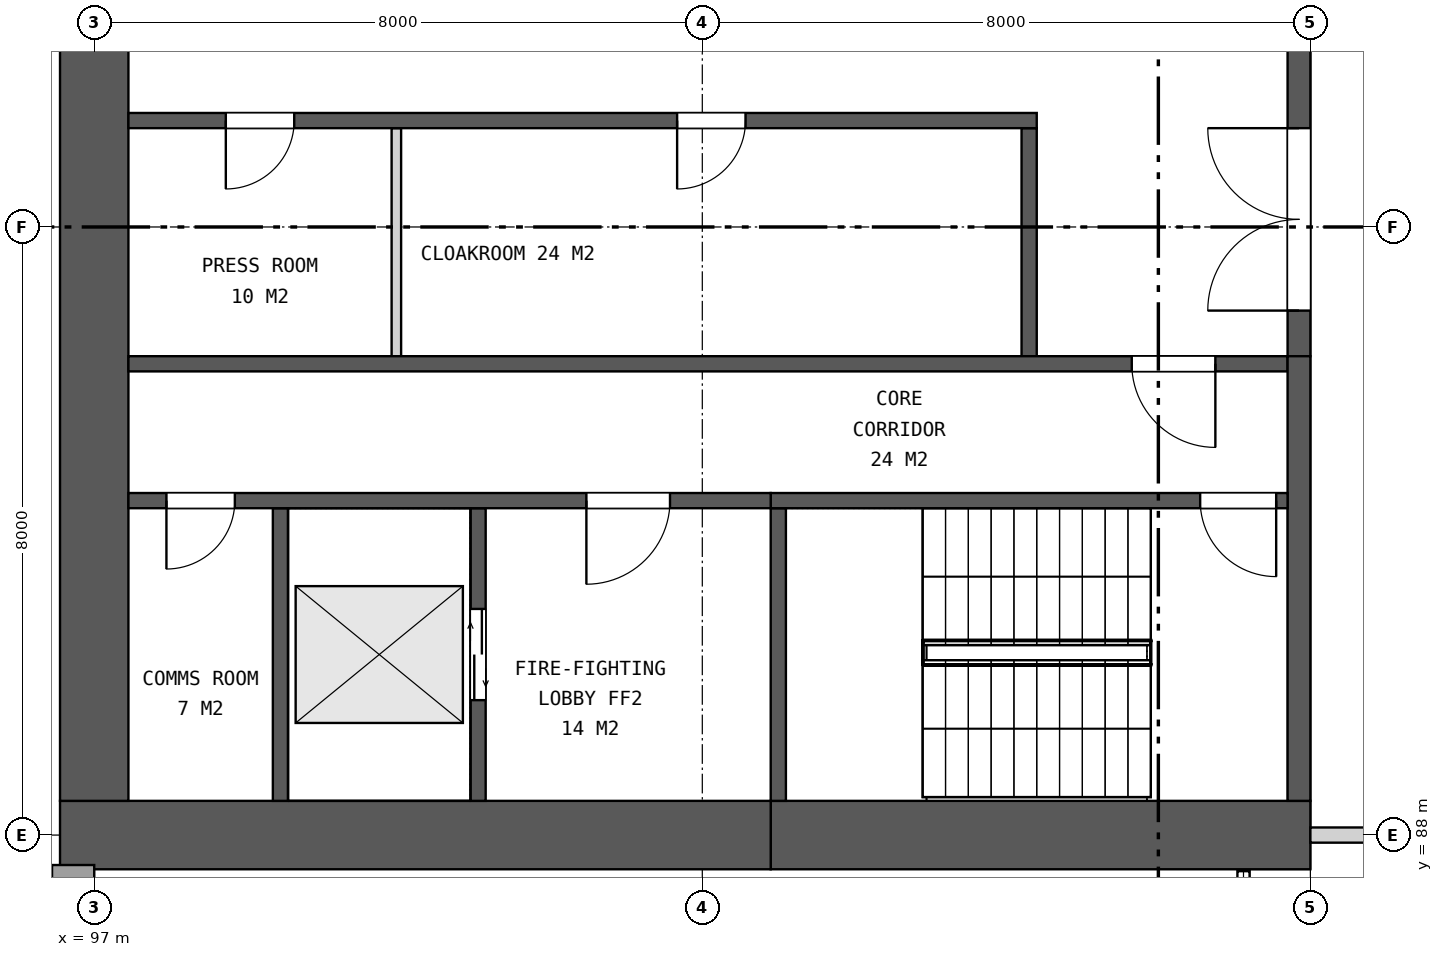
"""IFC4 building model, lengths in metres.
Left out: names, types, materials, properties, quantities, classifications, styles, units other than length and angle.
Written with IfcOpenShell. Run it as: python <this file> out.ifc"""

import sys

from ifc_helpers import new_model, si_unit, direction, frame, frame_2d, origin, place, context, subcontext, project, spatial, rectangle, extrude, element, fill, save


model = new_model("IFC4")
c1 = context("Model", 3, precision=1e-05, world=origin(), true_north=direction((0.0, 1.0)))
c2 = subcontext(c1, "Body", "Model", "MODEL_VIEW")
j1 = project(units=[si_unit("LENGTHUNIT", "METRE"), si_unit("PLANEANGLEUNIT", "RADIAN")], contexts=[c1])
p1 = place(None, origin())
s1 = spatial("IfcSite", under=j1, at=p1, CompositionType="ELEMENT")
p2 = place(p1, origin())
s2 = spatial("IfcBuilding", under=s1, at=p2, CompositionType="ELEMENT")
p3 = place(p2, frame((0.0, 0.0, 10.0)))
s3 = spatial("IfcBuildingStorey", under=s2, at=p3, CompositionType="ELEMENT", Elevation=10.0)
p4 = place(p3, frame((113.0, 88.0, 0.0), z_axis=(0.0, 0.0, 1.0), x_axis=(-1.0, 0.0, 0.0)))
e1 = element("IfcWall", 1, at=p4, inside=s3, PredefinedType="SHEAR", context=c2, shape_type="SweptSolid", body=[
    extrude(rectangle(XDim=7.1, YDim=0.9, at=frame_2d((3.55, 0.0))), origin(), (0.0, 0.0, 1.0), 7.5),
])
p5 = place(p3, frame((105.9, 88.0, 0.0), z_axis=(0.0, 0.0, 1.0), x_axis=(-1.0, 0.0, 0.0)))
e2 = element("IfcWall", 2, at=p5, inside=s3, PredefinedType="SHEAR", context=c2, shape_type="SweptSolid", body=[
    extrude(rectangle(XDim=9.35, YDim=0.9, at=frame_2d((4.675, 0.0))), origin(), (0.0, 0.0, 1.0), 7.5),
])
p6 = place(p3, frame((97.0, 111.55, 0.0), z_axis=(0.0, 0.0, 1.0), x_axis=(0.0, -1.0, 0.0)))
e3 = element("IfcWall", 3, at=p6, inside=s3, PredefinedType="SHEAR", context=c2, shape_type="SweptSolid", body=[
    extrude(rectangle(XDim=23.1, YDim=0.9, at=frame_2d((11.55, 0.0))), origin(), (0.0, 0.0, 1.0), 7.5),
])
p7 = place(p6, frame((10.35, 0.0, 0.0)))
e4 = element("IfcOpeningElement", 4, at=p7, cuts=e3, PredefinedType="OPENING", context=c2, shape_type="SweptSolid", body=[
    extrude(rectangle(XDim=2.4, YDim=2.4, at=frame_2d((1.2, 1.2))), frame((0.0, 0.46, 0.0), z_axis=(0.0, -1.0, 0.0), x_axis=(1.0, 0.0, 0.0)), (0.0, 0.0, 1.0), 0.92),
])
p8 = place(p3, frame((112.85, 105.7, 0.0), z_axis=(0.0, 0.0, 1.0), x_axis=(0.0, -1.0, 0.0)))
e5 = element("IfcWall", 5, at=p8, inside=s3, PredefinedType="SHEAR", context=c2, shape_type="SweptSolid", body=[
    extrude(rectangle(XDim=11.4, YDim=0.3, at=frame_2d((5.7, 0.0))), origin(), (0.0, 0.0, 1.0), 7.5),
])
p9 = place(p8, frame((0.6, 0.0, 0.0)))
e6 = element("IfcOpeningElement", 6, at=p9, cuts=e5, PredefinedType="OPENING", context=c2, shape_type="SweptSolid", body=[
    extrude(rectangle(XDim=2.4, YDim=2.4, at=frame_2d((1.2, 1.2))), frame((0.0, 0.16, 0.0), z_axis=(0.0, -1.0, 0.0), x_axis=(1.0, 0.0, 0.0)), (0.0, 0.0, 1.0), 0.32),
])
p10 = place(p8, frame((4.5, 0.0, 0.0)))
e7 = element("IfcOpeningElement", 7, at=p10, cuts=e5, PredefinedType="OPENING", context=c2, shape_type="SweptSolid", body=[
    extrude(rectangle(XDim=2.4, YDim=2.4, at=frame_2d((1.2, 1.2))), frame((0.0, 0.16, 0.0), z_axis=(0.0, -1.0, 0.0), x_axis=(1.0, 0.0, 0.0)), (0.0, 0.0, 1.0), 0.32),
])
p11 = place(p8, frame((8.4, 0.0, 0.0)))
e8 = element("IfcOpeningElement", 8, at=p11, cuts=e5, PredefinedType="OPENING", context=c2, shape_type="SweptSolid", body=[
    extrude(rectangle(XDim=2.4, YDim=2.4, at=frame_2d((1.2, 1.2))), frame((0.0, 0.16, 0.0), z_axis=(0.0, -1.0, 0.0), x_axis=(1.0, 0.0, 0.0)), (0.0, 0.0, 1.0), 0.32),
])
p12 = place(p3, frame((109.3, 97.3, 0.0), z_axis=(0.0, 0.0, 1.0), x_axis=(0.0, -1.0, 0.0)))
e9 = element("IfcWall", 9, at=p12, inside=s3, PredefinedType="SHEAR", context=c2, shape_type="SweptSolid", body=[
    extrude(rectangle(XDim=3.0, YDim=0.2, at=frame_2d((1.5, 0.0))), origin(), (0.0, 0.0, 1.0), 7.5),
])
p13 = place(p3, frame((100.975, 97.3, 0.0), z_axis=(0.0, 0.0, 1.0), x_axis=(0.0, -1.0, 0.0)))
e10 = element("IfcWall", 10, at=p13, inside=s3, PredefinedType="PARTITIONING", context=c2, shape_type="SweptSolid", body=[
    extrude(rectangle(XDim=3.0, YDim=0.125, at=frame_2d((1.5, 0.0))), origin(), (0.0, 0.0, 1.0), 7.5),
])
p14 = place(p3, frame((109.4, 97.4, 0.0), z_axis=(0.0, 0.0, 1.0), x_axis=(-1.0, 0.0, 0.0)))
e11 = element("IfcWall", 11, at=p14, inside=s3, PredefinedType="SHEAR", context=c2, shape_type="SweptSolid", body=[
    extrude(rectangle(XDim=11.95, YDim=0.2, at=frame_2d((5.975, 0.0))), origin(), (0.0, 0.0, 1.0), 7.5),
])
p15 = place(p14, frame((3.831, 0.0, 0.0)))
e12 = element("IfcOpeningElement", 12, at=p15, cuts=e11, PredefinedType="OPENING", context=c2, shape_type="SweptSolid", body=[
    extrude(rectangle(XDim=0.9, YDim=2.1, at=frame_2d((0.45, 1.05))), frame((0.0, 0.11, 0.0), z_axis=(0.0, -1.0, 0.0), x_axis=(1.0, 0.0, 0.0)), (0.0, 0.0, 1.0), 0.22),
])
p16 = place(p14, frame((9.769, 0.0, 0.0)))
e13 = element("IfcOpeningElement", 13, at=p16, cuts=e11, PredefinedType="OPENING", context=c2, shape_type="SweptSolid", body=[
    extrude(rectangle(XDim=0.9, YDim=2.1, at=frame_2d((0.45, 1.05))), frame((0.0, 0.11, 0.0), z_axis=(0.0, -1.0, 0.0), x_axis=(1.0, 0.0, 0.0)), (0.0, 0.0, 1.0), 0.22),
])
p17 = place(p3, frame((112.7, 94.2, 0.0), z_axis=(0.0, 0.0, 1.0), x_axis=(-1.0, 0.0, 0.0)))
e14 = element("IfcWall", 14, at=p17, inside=s3, PredefinedType="SHEAR", context=c2, shape_type="SweptSolid", body=[
    extrude(rectangle(XDim=15.25, YDim=0.2, at=frame_2d((7.625, 0.0))), origin(), (0.0, 0.0, 1.0), 7.5),
])
p18 = place(p17, frame((0.95, 0.0, 0.0)))
e15 = element("IfcOpeningElement", 15, at=p18, cuts=e14, PredefinedType="OPENING", context=c2, shape_type="SweptSolid", body=[
    extrude(rectangle(XDim=1.1, YDim=2.1, at=frame_2d((0.55, 1.05))), frame((0.0, 0.11, 0.0), z_axis=(0.0, -1.0, 0.0), x_axis=(1.0, 0.0, 0.0)), (0.0, 0.0, 1.0), 0.22),
])
p19 = place(p3, frame((112.85, 94.3, 0.0), z_axis=(0.0, 0.0, 1.0), x_axis=(0.0, -1.0, 0.0)))
e16 = element("IfcWall", 16, at=p19, inside=s3, PredefinedType="SHEAR", context=c2, shape_type="SweptSolid", body=[
    extrude(rectangle(XDim=5.85, YDim=0.3, at=frame_2d((2.925, 0.0))), origin(), (0.0, 0.0, 1.0), 7.5),
])
p20 = place(p3, frame((106.0, 92.3, 0.0), z_axis=(0.0, 0.0, 1.0), x_axis=(0.0, -1.0, 0.0)))
e17 = element("IfcWall", 17, at=p20, inside=s3, PredefinedType="SHEAR", context=c2, shape_type="SweptSolid", body=[
    extrude(rectangle(XDim=3.85, YDim=0.2, at=frame_2d((1.925, 0.0))), origin(), (0.0, 0.0, 1.0), 7.5),
])
p21 = place(p3, frame((102.05, 92.3, 0.0), z_axis=(0.0, 0.0, 1.0), x_axis=(0.0, -1.0, 0.0)))
e18 = element("IfcWall", 18, at=p21, inside=s3, PredefinedType="SHEAR", context=c2, shape_type="SweptSolid", body=[
    extrude(rectangle(XDim=3.85, YDim=0.2, at=frame_2d((1.925, 0.0))), origin(), (0.0, 0.0, 1.0), 7.5),
])
p22 = place(p21, frame((1.325, 0.0, 0.0)))
e19 = element("IfcOpeningElement", 19, at=p22, cuts=e18, PredefinedType="OPENING", context=c2, shape_type="SweptSolid", body=[
    extrude(rectangle(XDim=1.2, YDim=2.1, at=frame_2d((0.6, 1.05))), frame((0.0, 0.11, 0.0), z_axis=(0.0, -1.0, 0.0), x_axis=(1.0, 0.0, 0.0)), (0.0, 0.0, 1.0), 0.22),
])
p23 = place(p3, frame((99.45, 92.3, 0.0), z_axis=(0.0, 0.0, 1.0), x_axis=(0.0, -1.0, 0.0)))
e20 = element("IfcWall", 20, at=p23, inside=s3, PredefinedType="SHEAR", context=c2, shape_type="SweptSolid", body=[
    extrude(rectangle(XDim=3.85, YDim=0.2, at=frame_2d((1.925, 0.0))), origin(), (0.0, 0.0, 1.0), 7.5),
])
p24 = place(p3, frame((112.7, 92.4, 0.0), z_axis=(0.0, 0.0, 1.0), x_axis=(-1.0, 0.0, 0.0)))
e21 = element("IfcWall", 21, at=p24, inside=s3, PredefinedType="SHEAR", context=c2, shape_type="SweptSolid", body=[
    extrude(rectangle(XDim=6.8, YDim=0.2, at=frame_2d((3.4, 0.0))), origin(), (0.0, 0.0, 1.0), 7.5),
])
p25 = place(p24, frame((0.15, 0.0, 0.0)))
e22 = element("IfcOpeningElement", 22, at=p25, cuts=e21, PredefinedType="OPENING", context=c2, shape_type="SweptSolid", body=[
    extrude(rectangle(XDim=1.0, YDim=2.1, at=frame_2d((0.5, 1.05))), frame((0.0, 0.11, 0.0), z_axis=(0.0, -1.0, 0.0), x_axis=(1.0, 0.0, 0.0)), (0.0, 0.0, 1.0), 0.22),
])
p26 = place(p3, frame((105.9, 92.4, 0.0), z_axis=(0.0, 0.0, 1.0), x_axis=(-1.0, 0.0, 0.0)))
e23 = element("IfcWall", 23, at=p26, inside=s3, PredefinedType="SHEAR", context=c2, shape_type="SweptSolid", body=[
    extrude(rectangle(XDim=8.45, YDim=0.2, at=frame_2d((4.225, 0.0))), origin(), (0.0, 0.0, 1.0), 7.5),
])
p27 = place(p26, frame((1.325, 0.0, 0.0)))
e24 = element("IfcOpeningElement", 24, at=p27, cuts=e23, PredefinedType="OPENING", context=c2, shape_type="SweptSolid", body=[
    extrude(rectangle(XDim=1.1, YDim=2.1, at=frame_2d((0.55, 1.05))), frame((0.0, 0.11, 0.0), z_axis=(0.0, -1.0, 0.0), x_axis=(1.0, 0.0, 0.0)), (0.0, 0.0, 1.0), 0.22),
])
p28 = place(p26, frame((7.05, 0.0, 0.0)))
e25 = element("IfcOpeningElement", 25, at=p28, cuts=e23, PredefinedType="OPENING", context=c2, shape_type="SweptSolid", body=[
    extrude(rectangle(XDim=0.9, YDim=2.1, at=frame_2d((0.45, 1.05))), frame((0.0, 0.11, 0.0), z_axis=(0.0, -1.0, 0.0), x_axis=(1.0, 0.0, 0.0)), (0.0, 0.0, 1.0), 0.22),
])
p29 = place(p3, frame((96.445, 87.403, 0.0), z_axis=(0.0, 0.0, 1.0), x_axis=(1.0, 0.0, 0.0)))
e26 = element("IfcWall", 26, at=p29, inside=s3, PredefinedType="SOLIDWALL", context=c2, shape_type="SweptSolid", body=[
    extrude(rectangle(XDim=0.555, YDim=0.406, at=frame_2d((0.277, 0.0))), origin(), (0.0, 0.0, 1.0), 7.1),
])
p30 = place(p3, frame((113.0, 88.0, 0.0), z_axis=(0.0, 0.0, 1.0), x_axis=(1.0, 0.0, 0.0)))
e27 = element("IfcWall", 27, at=p30, inside=s3, PredefinedType="PARTITIONING", context=c2, shape_type="SweptSolid", body=[
    extrude(rectangle(XDim=7.4, YDim=0.2, at=frame_2d((3.7, 0.0))), origin(), (0.0, 0.0, 1.0), 6.551),
])
p31 = place(p30, frame((2.8, 0.0, 0.0)))
e28 = element("IfcOpeningElement", 28, at=p31, cuts=e27, PredefinedType="OPENING", context=c2, shape_type="SweptSolid", body=[
    extrude(rectangle(XDim=2.4, YDim=2.4, at=frame_2d((1.2, 1.2))), frame((0.0, 0.11, 0.0), z_axis=(0.0, -1.0, 0.0), x_axis=(1.0, 0.0, 0.0)), (0.0, 0.0, 1.0), 0.22),
])
p32 = place(p11, frame((2.4, 0.0, 0.0), z_axis=(0.0, 0.0, 1.0), x_axis=(-1.0, 0.0, 0.0)))
e29 = element("IfcDoor", 29, at=p32, inside=s3, OperationType="DOUBLE_DOOR_SINGLE_SWING", PredefinedType="DOOR", context=c2, shape_type="SweptSolid", body=[
    extrude(rectangle(XDim=2.4, YDim=2.4, at=frame_2d((1.2, 1.2))), frame((0.0, 0.025, 0.0), z_axis=(0.0, -1.0, 0.0), x_axis=(1.0, 0.0, 0.0)), (0.0, 0.0, 1.0), 0.05),
])
fill(e8, e29)
p33 = place(p15, origin())
e30 = element("IfcDoor", 30, at=p33, inside=s3, OperationType="SINGLE_SWING_RIGHT", PredefinedType="DOOR", context=c2, shape_type="SweptSolid", body=[
    extrude(rectangle(XDim=0.9, YDim=2.1, at=frame_2d((0.45, 1.05))), frame((0.0, 0.025, 0.0), z_axis=(0.0, -1.0, 0.0), x_axis=(1.0, 0.0, 0.0)), (0.0, 0.0, 1.0), 0.05),
])
fill(e12, e30)
p34 = place(p16, origin())
e31 = element("IfcDoor", 31, at=p34, inside=s3, OperationType="SINGLE_SWING_RIGHT", PredefinedType="DOOR", context=c2, shape_type="SweptSolid", body=[
    extrude(rectangle(XDim=0.9, YDim=2.1, at=frame_2d((0.45, 1.05))), frame((0.0, 0.025, 0.0), z_axis=(0.0, -1.0, 0.0), x_axis=(1.0, 0.0, 0.0)), (0.0, 0.0, 1.0), 0.05),
])
fill(e13, e31)
p35 = place(p18, origin())
e32 = element("IfcDoor", 32, at=p35, inside=s3, OperationType="SINGLE_SWING_LEFT", PredefinedType="DOOR", context=c2, shape_type="SweptSolid", body=[
    extrude(rectangle(XDim=1.1, YDim=2.1, at=frame_2d((0.55, 1.05))), frame((0.0, 0.025, 0.0), z_axis=(0.0, -1.0, 0.0), x_axis=(1.0, 0.0, 0.0)), (0.0, 0.0, 1.0), 0.05),
])
fill(e15, e32)
p36 = place(p22, origin())
e33 = element("IfcDoor", 33, at=p36, inside=s3, OperationType="DOUBLE_DOOR_SLIDING", PredefinedType="DOOR", context=c2, shape_type="SweptSolid", body=[
    extrude(rectangle(XDim=1.2, YDim=2.1, at=frame_2d((0.6, 1.05))), frame((0.0, 0.025, 0.0), z_axis=(0.0, -1.0, 0.0), x_axis=(1.0, 0.0, 0.0)), (0.0, 0.0, 1.0), 0.05),
])
fill(e19, e33)
p37 = place(p25, origin())
e34 = element("IfcDoor", 34, at=p37, inside=s3, OperationType="SINGLE_SWING_LEFT", PredefinedType="DOOR", context=c2, shape_type="SweptSolid", body=[
    extrude(rectangle(XDim=1.0, YDim=2.1, at=frame_2d((0.5, 1.05))), frame((0.0, 0.025, 0.0), z_axis=(0.0, -1.0, 0.0), x_axis=(1.0, 0.0, 0.0)), (0.0, 0.0, 1.0), 0.05),
])
fill(e22, e34)
p38 = place(p27, origin())
e35 = element("IfcDoor", 35, at=p38, inside=s3, OperationType="SINGLE_SWING_RIGHT", PredefinedType="DOOR", context=c2, shape_type="SweptSolid", body=[
    extrude(rectangle(XDim=1.1, YDim=2.1, at=frame_2d((0.55, 1.05))), frame((0.0, 0.025, 0.0), z_axis=(0.0, -1.0, 0.0), x_axis=(1.0, 0.0, 0.0)), (0.0, 0.0, 1.0), 0.05),
])
fill(e24, e35)
p39 = place(p28, origin())
e36 = element("IfcDoor", 36, at=p39, inside=s3, OperationType="SINGLE_SWING_RIGHT", PredefinedType="DOOR", context=c2, shape_type="SweptSolid", body=[
    extrude(rectangle(XDim=0.9, YDim=2.1, at=frame_2d((0.45, 1.05))), frame((0.0, 0.025, 0.0), z_axis=(0.0, -1.0, 0.0), x_axis=(1.0, 0.0, 0.0)), (0.0, 0.0, 1.0), 0.05),
])
fill(e25, e36)
save(model, sys.argv[1])
